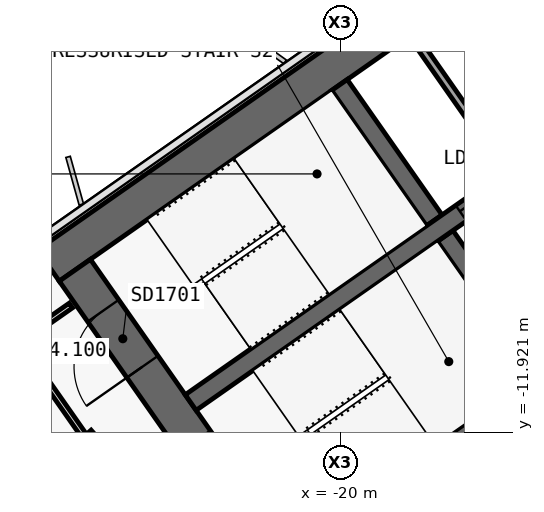
"""IFC4 building model, lengths in metres.
Left out: names, types, materials, properties, quantities, classifications, styles, units other than length and angle.
Written with IfcOpenShell. Run it as: python <this file> out.ifc"""

import sys

from ifc_helpers import new_model, si_unit, direction, frame, frame_2d, origin, place, context, subcontext, project, spatial, polyline, rectangle, outline, extrude, element, fill, save


model = new_model("IFC4")
c1 = context("Model", 3, precision=1e-05, world=origin(), true_north=direction((0.0, 1.0)))
c2 = subcontext(c1, "Body", "Model", "MODEL_VIEW")
j1 = project(units=[si_unit("LENGTHUNIT", "METRE"), si_unit("PLANEANGLEUNIT", "RADIAN")], contexts=[c1])
p1 = place(None, origin())
s1 = spatial("IfcSite", under=j1, at=p1, CompositionType="ELEMENT")
p2 = place(p1, origin())
s2 = spatial("IfcBuilding", under=s1, at=p2, CompositionType="ELEMENT")
p3 = place(p2, frame((0.0, 0.0, 94.1)))
s3 = spatial("IfcBuildingStorey", under=s2, at=p3, CompositionType="ELEMENT", Elevation=94.1)
p4 = place(p3, frame((0.037, 11.867, 0.0), z_axis=(0.0, 0.0, 1.0), x_axis=(-0.819155306259, -0.573571777746, 0.0)))
e1 = element("IfcWall", 1, at=p4, inside=s3, PredefinedType="SHEAR", context=c2, shape_type="SweptSolid", body=[
    extrude(outline(polyline([(33.837, 0.5), (0.7, 0.5), (0.0, -0.5), (33.837, -0.5), (33.837, 0.5)])), origin(), (0.0, 0.0, 1.0), 3.6),
])
p5 = place(p3, frame((0.037, -0.585, 0.0), z_axis=(0.0, 0.0, 1.0), x_axis=(-0.819157152511, -0.573569140985, 0.0)))
e2 = element("IfcWall", 2, at=p5, inside=s3, PredefinedType="SHEAR", context=c2, shape_type="SweptSolid", body=[
    extrude(outline(polyline([(26.695, 0.5), (0.7, 0.5), (0.0, -0.5), (26.695, -0.5), (26.695, 0.5)])), origin(), (0.0, 0.0, 1.0), 3.6),
])
p6 = place(p5, frame((2.995, 0.0, 0.0)))
e3 = element("IfcOpeningElement", 3, at=p6, cuts=e2, PredefinedType="OPENING", context=c2, shape_type="SweptSolid", body=[
    extrude(rectangle(XDim=2.4, YDim=2.1, at=frame_2d((1.2, 1.05))), frame((0.0, 0.51, 0.0), z_axis=(0.0, -1.0, 0.0), x_axis=(1.0, 0.0, 0.0)), (0.0, 0.0, 1.0), 1.02),
])
p7 = place(p5, frame((11.995, 0.0, 0.0)))
e4 = element("IfcOpeningElement", 4, at=p7, cuts=e2, PredefinedType="OPENING", context=c2, shape_type="SweptSolid", body=[
    extrude(rectangle(XDim=2.4, YDim=2.1, at=frame_2d((1.2, 1.05))), frame((0.0, 0.51, 0.0), z_axis=(0.0, -1.0, 0.0), x_axis=(1.0, 0.0, 0.0)), (0.0, 0.0, 1.0), 1.02),
])
p8 = place(p3, frame((-21.708, -15.2, 0.0), z_axis=(0.0, 0.0, 1.0), x_axis=(-0.573576324356, 0.819152122709, 0.0)))
e5 = element("IfcWall", 5, at=p8, inside=s3, PredefinedType="SHEAR", context=c2, shape_type="SweptSolid", body=[
    extrude(outline(polyline([(0.0, 0.5), (0.0, -0.5), (9.2, -0.5), (9.2, 0.5), (0.0, 0.5)])), origin(), (0.0, 0.0, 1.0), 3.6),
])
p9 = place(p8, frame((6.1, 0.0, 0.0)))
e6 = element("IfcOpeningElement", 6, at=p9, cuts=e5, PredefinedType="OPENING", context=c2, shape_type="SweptSolid", body=[
    extrude(rectangle(XDim=1.8, YDim=2.1, at=frame_2d((0.9, 1.05))), frame((0.0, 0.51, 0.0), z_axis=(0.0, -1.0, 0.0), x_axis=(1.0, 0.0, 0.0)), (0.0, 0.0, 1.0), 1.02),
])
p10 = place(p8, frame((1.9, 0.0, 0.0)))
e7 = element("IfcOpeningElement", 7, at=p10, cuts=e5, PredefinedType="OPENING", context=c2, shape_type="SweptSolid", body=[
    extrude(rectangle(XDim=1.8, YDim=2.1, at=frame_2d((0.9, 1.05))), frame((0.0, 0.51, 0.0), z_axis=(0.0, -1.0, 0.0), x_axis=(1.0, 0.0, 0.0)), (0.0, 0.0, 1.0), 1.02),
])
p11 = place(p3, frame((-14.745, -10.324, 0.0), z_axis=(0.0, 0.0, 1.0), x_axis=(-0.57356780395, 0.819158088694, 0.0)))
e8 = element("IfcWall", 8, at=p11, inside=s3, PredefinedType="SHEAR", context=c2, shape_type="SweptSolid", body=[
    extrude(outline(polyline([(4.35, 0.25), (0.0, 0.25), (0.0, -0.25), (4.35, -0.25), (4.35, 0.25)])), origin(), (0.0, 0.0, 1.0), 3.6),
])
p12 = place(p3, frame((-17.527, -6.352, 0.0), z_axis=(0.0, 0.0, 1.0), x_axis=(-0.573530143085, 0.819184457233, 0.0)))
e9 = element("IfcWall", 9, at=p12, inside=s3, PredefinedType="SHEAR", context=c2, shape_type="SweptSolid", body=[
    extrude(outline(polyline([(4.35, -0.25), (4.35, 0.25), (0.0, 0.25), (0.0, -0.25), (4.35, -0.25)])), origin(), (0.0, 0.0, 1.0), 3.6),
])
p13 = place(p3, frame((-2.638, 3.768, 0.0), z_axis=(0.0, 0.0, 1.0), x_axis=(-0.819148977158, -0.573580816643, 0.0)))
e10 = element("IfcWall", 10, at=p13, inside=s3, PredefinedType="SHEAR", context=c2, shape_type="SweptSolid", body=[
    extrude(outline(polyline([(26.0, 0.25), (0.0, 0.25), (0.0, -0.25), (26.0, -0.25), (26.0, 0.25)])), origin(), (0.0, 0.0, 1.0), 3.6),
])
p14 = place(p13, frame((1.169, 0.0, 0.0)))
e11 = element("IfcOpeningElement", 11, at=p14, cuts=e10, PredefinedType="OPENING", context=c2, shape_type="SweptSolid", body=[
    extrude(rectangle(XDim=1.1, YDim=2.1, at=frame_2d((0.55, 1.05))), frame((0.0, 0.26, 0.0), z_axis=(0.0, -1.0, 0.0), x_axis=(1.0, 0.0, 0.0)), (0.0, 0.0, 1.0), 0.52),
])
p15 = place(p13, frame((3.206, 0.0, 0.0)))
e12 = element("IfcOpeningElement", 12, at=p15, cuts=e10, PredefinedType="OPENING", context=c2, shape_type="SweptSolid", body=[
    extrude(rectangle(XDim=1.1, YDim=2.1, at=frame_2d((0.55, 1.05))), frame((0.0, 0.26, 0.0), z_axis=(0.0, -1.0, 0.0), x_axis=(1.0, 0.0, 0.0)), (0.0, 0.0, 1.0), 0.52),
])
p16 = place(p13, frame((5.244, 0.0, 0.0)))
e13 = element("IfcOpeningElement", 13, at=p16, cuts=e10, PredefinedType="OPENING", context=c2, shape_type="SweptSolid", body=[
    extrude(rectangle(XDim=1.1, YDim=2.1, at=frame_2d((0.55, 1.05))), frame((0.0, 0.26, 0.0), z_axis=(0.0, -1.0, 0.0), x_axis=(1.0, 0.0, 0.0)), (0.0, 0.0, 1.0), 0.52),
])
p17 = place(p13, frame((7.281, 0.0, 0.0)))
e14 = element("IfcOpeningElement", 14, at=p17, cuts=e10, PredefinedType="OPENING", context=c2, shape_type="SweptSolid", body=[
    extrude(rectangle(XDim=1.1, YDim=2.1, at=frame_2d((0.55, 1.05))), frame((0.0, 0.26, 0.0), z_axis=(0.0, -1.0, 0.0), x_axis=(1.0, 0.0, 0.0)), (0.0, 0.0, 1.0), 0.52),
])
p18 = place(p13, frame((9.688, 0.0, 0.0)))
e15 = element("IfcOpeningElement", 15, at=p18, cuts=e10, PredefinedType="OPENING", context=c2, shape_type="SweptSolid", body=[
    extrude(rectangle(XDim=1.1, YDim=2.1, at=frame_2d((0.55, 1.05))), frame((0.0, 0.26, 0.0), z_axis=(0.0, -1.0, 0.0), x_axis=(1.0, 0.0, 0.0)), (0.0, 0.0, 1.0), 0.52),
])
p19 = place(p13, frame((11.863, 0.0, 0.0)))
e16 = element("IfcOpeningElement", 16, at=p19, cuts=e10, PredefinedType="OPENING", context=c2, shape_type="SweptSolid", body=[
    extrude(rectangle(XDim=1.1, YDim=2.1, at=frame_2d((0.55, 1.05))), frame((0.0, 0.26, 0.0), z_axis=(0.0, -1.0, 0.0), x_axis=(1.0, 0.0, 0.0)), (0.0, 0.0, 1.0), 0.52),
])
p20 = place(p13, frame((14.038, 0.0, 0.0)))
e17 = element("IfcOpeningElement", 17, at=p20, cuts=e10, PredefinedType="OPENING", context=c2, shape_type="SweptSolid", body=[
    extrude(rectangle(XDim=1.1, YDim=2.1, at=frame_2d((0.55, 1.05))), frame((0.0, 0.26, 0.0), z_axis=(0.0, -1.0, 0.0), x_axis=(1.0, 0.0, 0.0)), (0.0, 0.0, 1.0), 0.52),
])
p21 = place(p13, frame((16.212, 0.0, 0.0)))
e18 = element("IfcOpeningElement", 18, at=p21, cuts=e10, PredefinedType="OPENING", context=c2, shape_type="SweptSolid", body=[
    extrude(rectangle(XDim=1.1, YDim=2.1, at=frame_2d((0.55, 1.05))), frame((0.0, 0.26, 0.0), z_axis=(0.0, -1.0, 0.0), x_axis=(1.0, 0.0, 0.0)), (0.0, 0.0, 1.0), 0.52),
])
p22 = place(p3, frame((-15.622, -5.018, 0.0), z_axis=(0.0, 0.0, 1.0), x_axis=(-0.573594173421, 0.819139624372, 0.0)))
e19 = element("IfcWall", 19, at=p22, inside=s3, PredefinedType="SOLIDWALL", context=c2, shape_type="SweptSolid", body=[
    extrude(rectangle(XDim=4.35, YDim=0.2, at=frame_2d((2.175, 0.0))), origin(), (0.0, 0.0, 1.0), 3.6),
])
p23 = place(p3, frame((-26.746, -12.014, 0.0), z_axis=(0.0, 0.0, 1.0), x_axis=(-0.573560650686, 0.819163097304, 0.0)))
e20 = element("IfcWall", 20, at=p23, inside=s3, PredefinedType="PARTITIONING", context=c2, shape_type="SweptSolid", body=[
    extrude(rectangle(XDim=3.0, YDim=0.15, at=frame_2d((1.5, 0.0))), origin(), (0.0, 0.0, 1.0), 3.32),
])
p24 = place(p3, frame((-28.467, -9.556, 0.0), z_axis=(0.0, 0.0, 1.0), x_axis=(0.819109000826, 0.573637903879, 0.0)))
e21 = element("IfcWall", 21, at=p24, inside=s3, PredefinedType="PARTITIONING", context=c2, shape_type="SweptSolid", body=[
    extrude(rectangle(XDim=1.68, YDim=0.15, at=frame_2d((0.84, 0.0))), origin(), (0.0, 0.0, 1.0), 3.32),
])
p25 = place(p3, frame((-22.284, -16.827, 0.0), z_axis=(0.0, 0.0, 1.0), x_axis=(-0.661545117561, 0.749905365651, 0.0)))
e22 = element("IfcWall", 22, at=p25, inside=s3, PredefinedType="PARTITIONING", context=c2, shape_type="SweptSolid", body=[
    extrude(rectangle(XDim=6.543, YDim=0.15, at=frame_2d((3.271, 0.0))), origin(), (0.0, 0.0, 1.0), 2.6),
])
p26 = place(p21, origin())
e23 = element("IfcDoor", 23, at=p26, inside=s3, OperationType="SLIDING_TO_RIGHT", PredefinedType="DOOR", context=c2, shape_type="SweptSolid", body=[
    extrude(rectangle(XDim=1.1, YDim=2.1, at=frame_2d((0.55, 1.05))), frame((0.0, 0.025, 0.0), z_axis=(0.0, -1.0, 0.0), x_axis=(1.0, 0.0, 0.0)), (0.0, 0.0, 1.0), 0.05),
])
fill(e18, e23)
p27 = place(p9, origin())
e24 = element("IfcDoor", 24, at=p27, inside=s3, OperationType="DOUBLE_DOOR_SINGLE_SWING", PredefinedType="DOOR", context=c2, shape_type="SweptSolid", body=[
    extrude(rectangle(XDim=1.8, YDim=2.1, at=frame_2d((0.9, 1.05))), frame((0.0, 0.025, 0.0), z_axis=(0.0, -1.0, 0.0), x_axis=(1.0, 0.0, 0.0)), (0.0, 0.0, 1.0), 0.05),
])
fill(e6, e24)
save(model, sys.argv[1])
